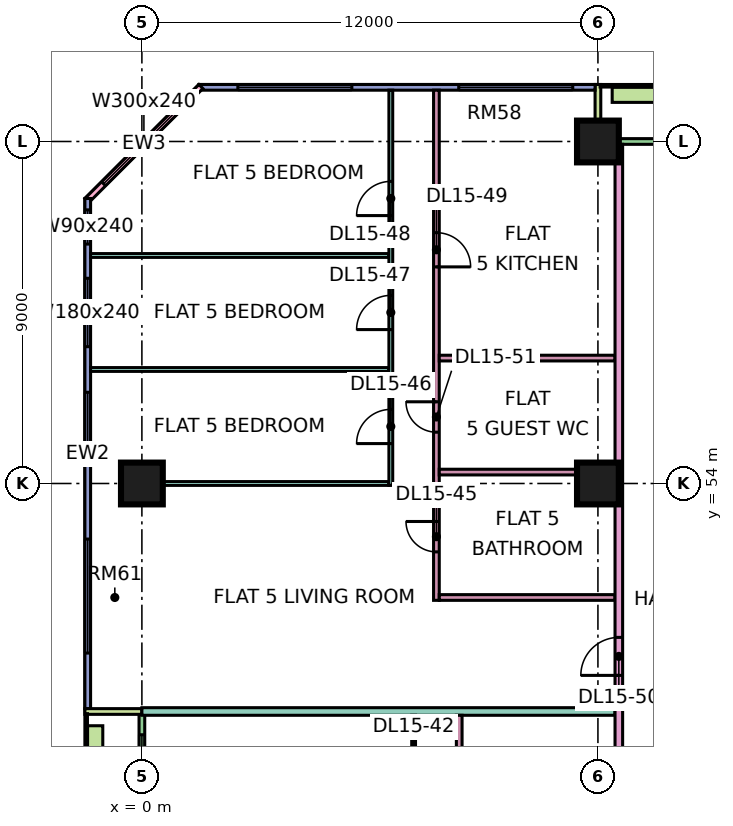
"""IFC4 building model, lengths in metres.
Left out: names, types, materials, properties, quantities, classifications, styles, units other than length and angle.
Written with IfcOpenShell. Run it as: python <this file> out.ifc"""

import sys

from ifc_helpers import new_model, si_unit, direction, frame, frame_2d, origin, origin_2d, place, context, subcontext, project, spatial, rectangle, extrude, element, fill, save


model = new_model("IFC4")
c1 = context("Model", 3, precision=1e-05, world=origin(), true_north=direction((0.0, 1.0)))
c2 = subcontext(c1, "Body", "Model", "MODEL_VIEW")
j1 = project(units=[si_unit("LENGTHUNIT", "METRE"), si_unit("PLANEANGLEUNIT", "RADIAN")], contexts=[c1])
p1 = place(None, origin())
s1 = spatial("IfcSite", under=j1, at=p1, CompositionType="ELEMENT")
p2 = place(p1, origin())
s2 = spatial("IfcBuilding", under=s1, at=p2, CompositionType="ELEMENT")
p3 = place(p2, frame((0.0, 0.0, 71.4)))
s3 = spatial("IfcBuildingStorey", under=s2, at=p3, CompositionType="ELEMENT", Elevation=71.4)
p4 = place(p3, frame((0.0, 54.0, 0.0), z_axis=(0.0, 0.0, 1.0), x_axis=(1.0, 0.0, 0.0)))
e1 = element("IfcColumn", 1, at=p4, inside=s3, PredefinedType="COLUMN", context=c2, shape_type="SweptSolid", body=[
    extrude(rectangle(XDim=1.1, YDim=1.1, at=origin_2d()), origin(), (0.0, 0.0, 1.0), 3.75),
])
for number, where, z_axis, x_axis in (
    (2, (12.0, 54.0, 0.0), (0.0, 0.0, 1.0), (1.0, 0.0, 0.0)),
    (3, (12.0, 63.0, 0.0), (0.0, 0.0, 1.0), (1.0, 0.0, 0.0)),
):
    element("IfcColumn", number, at=place(p3, frame(where, z_axis=z_axis, x_axis=x_axis)), inside=s3, PredefinedType="COLUMN", context=c2, shape_type="SweptSolid", body=[
        extrude(rectangle(XDim=1.1, YDim=1.1, at=origin_2d()), origin(), (0.0, 0.0, 1.0), 3.75),
    ])
p5 = place(p3, frame((22.425, 63.0, 0.0), z_axis=(0.0, 0.0, 1.0), x_axis=(-1.0, 0.0, 0.0)))
e4 = element("IfcWall", 4, at=p5, inside=s3, PredefinedType="SOLIDWALL", context=c2, shape_type="SweptSolid", body=[
    extrude(rectangle(XDim=10.35, YDim=0.15, at=frame_2d((5.175, 0.0))), origin(), (0.0, 0.0, 1.0), 3.35),
])
p6 = place(p5, frame((2.512, 0.0, 0.0)))
e5 = element("IfcOpeningElement", 5, at=p6, cuts=e4, PredefinedType="OPENING", context=c2, shape_type="SweptSolid", body=[
    extrude(rectangle(XDim=1.8, YDim=2.4, at=frame_2d((0.9, 1.2))), frame((0.0, 0.085, 0.0), z_axis=(0.0, -1.0, 0.0), x_axis=(1.0, 0.0, 0.0)), (0.0, 0.0, 1.0), 0.17),
])
p7 = place(p3, frame((12.0, 64.5, 0.0), z_axis=(0.0, 0.0, 1.0), x_axis=(0.0, -1.0, 0.0)))
e6 = element("IfcWall", 6, at=p7, inside=s3, PredefinedType="SOLIDWALL", context=c2, shape_type="SweptSolid", body=[
    extrude(rectangle(XDim=1.5, YDim=0.15, at=frame_2d((0.75, 0.0))), origin(), (0.0, 0.0, 1.0), 3.35),
])
p8 = place(p3, frame((11.925, 64.425, 0.0), z_axis=(0.0, 0.0, 1.0), x_axis=(-1.0, 0.0, 0.0)))
e7 = element("IfcWall", 7, at=p8, inside=s3, PredefinedType="SOLIDWALL", context=c2, shape_type="SweptSolid", body=[
    extrude(rectangle(XDim=10.425, YDim=0.15, at=frame_2d((5.212, 0.0))), origin(), (0.0, 0.0, 1.0), 3.35),
])
p9 = place(p8, frame((0.587, 0.0, 0.45)))
e8 = element("IfcOpeningElement", 8, at=p9, cuts=e7, PredefinedType="OPENING", context=c2, shape_type="SweptSolid", body=[
    extrude(rectangle(XDim=3.0, YDim=2.4, at=frame_2d((1.5, 1.2))), frame((0.0, 0.085, 0.0), z_axis=(0.0, -1.0, 0.0), x_axis=(1.0, 0.0, 0.0)), (0.0, 0.0, 1.0), 0.17),
])
p10 = place(p8, frame((6.4, 0.0, 0.45)))
e9 = element("IfcOpeningElement", 9, at=p10, cuts=e7, PredefinedType="OPENING", context=c2, shape_type="SweptSolid", body=[
    extrude(rectangle(XDim=3.0, YDim=2.4, at=frame_2d((1.5, 1.2))), frame((0.0, 0.085, 0.0), z_axis=(0.0, -1.0, 0.0), x_axis=(1.0, 0.0, 0.0)), (0.0, 0.0, 1.0), 0.17),
])
p11 = place(p3, frame((1.553, 64.447, 0.0), z_axis=(0.0, 0.0, 1.0), x_axis=(-0.707106781187, -0.707106781187, 0.0)))
e10 = element("IfcWall", 10, at=p11, inside=s3, PredefinedType="SOLIDWALL", context=c2, shape_type="SweptSolid", body=[
    extrude(rectangle(XDim=4.243, YDim=0.15, at=frame_2d((2.121, 0.0))), origin(), (0.0, 0.0, 1.0), 3.35),
])
p12 = place(p11, frame((0.621, 0.0, 0.45)))
e11 = element("IfcOpeningElement", 11, at=p12, cuts=e10, PredefinedType="OPENING", context=c2, shape_type="SweptSolid", body=[
    extrude(rectangle(XDim=3.0, YDim=2.4, at=frame_2d((1.5, 1.2))), frame((0.0, 0.085, 0.0), z_axis=(0.0, -1.0, 0.0), x_axis=(1.0, 0.0, 0.0)), (0.0, 0.0, 1.0), 0.17),
])
p13 = place(p3, frame((-1.425, 61.5, 0.0), z_axis=(0.0, 0.0, 1.0), x_axis=(0.0, -1.0, 0.0)))
e12 = element("IfcWall", 12, at=p13, inside=s3, PredefinedType="SOLIDWALL", context=c2, shape_type="SweptSolid", body=[
    extrude(rectangle(XDim=13.425, YDim=0.15, at=frame_2d((6.712, 0.0))), origin(), (0.0, 0.0, 1.0), 3.35),
])
p14 = place(p13, frame((0.3, 0.0, 0.45)))
e13 = element("IfcOpeningElement", 13, at=p14, cuts=e12, PredefinedType="OPENING", context=c2, shape_type="SweptSolid", body=[
    extrude(rectangle(XDim=0.9, YDim=2.4, at=frame_2d((0.45, 1.2))), frame((0.0, 0.085, 0.0), z_axis=(0.0, -1.0, 0.0), x_axis=(1.0, 0.0, 0.0)), (0.0, 0.0, 1.0), 0.17),
])
p15 = place(p13, frame((2.1, 0.0, 0.45)))
e14 = element("IfcOpeningElement", 14, at=p15, cuts=e12, PredefinedType="OPENING", context=c2, shape_type="SweptSolid", body=[
    extrude(rectangle(XDim=1.8, YDim=2.4, at=frame_2d((0.9, 1.2))), frame((0.0, 0.085, 0.0), z_axis=(0.0, -1.0, 0.0), x_axis=(1.0, 0.0, 0.0)), (0.0, 0.0, 1.0), 0.17),
])
p16 = place(p13, frame((5.1, 0.0, 0.45)))
e15 = element("IfcOpeningElement", 15, at=p16, cuts=e12, PredefinedType="OPENING", context=c2, shape_type="SweptSolid", body=[
    extrude(rectangle(XDim=1.8, YDim=2.4, at=frame_2d((0.9, 1.2))), frame((0.0, 0.085, 0.0), z_axis=(0.0, -1.0, 0.0), x_axis=(1.0, 0.0, 0.0)), (0.0, 0.0, 1.0), 0.17),
])
p17 = place(p13, frame((8.962, 0.0, 0.45)))
e16 = element("IfcOpeningElement", 16, at=p17, cuts=e12, PredefinedType="OPENING", context=c2, shape_type="SweptSolid", body=[
    extrude(rectangle(XDim=3.0, YDim=2.4, at=frame_2d((1.5, 1.2))), frame((0.0, 0.085, 0.0), z_axis=(0.0, -1.0, 0.0), x_axis=(1.0, 0.0, 0.0)), (0.0, 0.0, 1.0), 0.17),
])
p18 = place(p3, frame((0.0, 47.925, 0.0), z_axis=(0.0, 0.0, 1.0), x_axis=(0.0, -1.0, 0.0)))
e17 = element("IfcWall", 17, at=p18, inside=s3, PredefinedType="SOLIDWALL", context=c2, shape_type="SweptSolid", body=[
    extrude(rectangle(XDim=11.85, YDim=0.15, at=frame_2d((5.925, 0.0))), origin(), (0.0, 0.0, 1.0), 3.35),
])
p19 = place(p18, frame((0.538, 0.0, 0.45)))
e18 = element("IfcOpeningElement", 18, at=p19, cuts=e17, PredefinedType="OPENING", context=c2, shape_type="SweptSolid", body=[
    extrude(rectangle(XDim=1.2, YDim=2.4, at=frame_2d((0.6, 1.2))), frame((0.0, 0.085, 0.0), z_axis=(0.0, -1.0, 0.0), x_axis=(1.0, 0.0, 0.0)), (0.0, 0.0, 1.0), 0.17),
])
p20 = place(p18, frame((4.15, 0.0, 0.45)))
e19 = element("IfcOpeningElement", 19, at=p20, cuts=e17, PredefinedType="OPENING", context=c2, shape_type="SweptSolid", body=[
    extrude(rectangle(XDim=1.2, YDim=2.4, at=frame_2d((0.6, 1.2))), frame((0.0, 0.085, 0.0), z_axis=(0.0, -1.0, 0.0), x_axis=(1.0, 0.0, 0.0)), (0.0, 0.0, 1.0), 0.17),
])
p21 = place(p18, frame((6.525, 0.0, 0.0)))
e20 = element("IfcOpeningElement", 20, at=p21, cuts=e17, PredefinedType="OPENING", context=c2, shape_type="SweptSolid", body=[
    extrude(rectangle(XDim=1.8, YDim=2.4, at=frame_2d((0.9, 1.2))), frame((0.0, 0.085, 0.0), z_axis=(0.0, -1.0, 0.0), x_axis=(1.0, 0.0, 0.0)), (0.0, 0.0, 1.0), 0.17),
])
p22 = place(p18, frame((9.5, 0.0, 0.45)))
e21 = element("IfcOpeningElement", 21, at=p22, cuts=e17, PredefinedType="OPENING", context=c2, shape_type="SweptSolid", body=[
    extrude(rectangle(XDim=1.2, YDim=2.4, at=frame_2d((0.6, 1.2))), frame((0.0, 0.085, 0.0), z_axis=(0.0, -1.0, 0.0), x_axis=(1.0, 0.0, 0.0)), (0.0, 0.0, 1.0), 0.17),
])
p23 = place(p3, frame((-1.5, 48.0, 0.0), z_axis=(0.0, 0.0, 1.0), x_axis=(1.0, 0.0, 0.0)))
e22 = element("IfcWall", 22, at=p23, inside=s3, PredefinedType="SOLIDWALL", context=c2, shape_type="SweptSolid", body=[
    extrude(rectangle(XDim=1.5, YDim=0.15, at=frame_2d((0.75, 0.0))), origin(), (0.0, 0.0, 1.0), 3.35),
])
p24 = place(p3, frame((22.125, 64.229, 0.0), z_axis=(0.0, 0.0, 1.0), x_axis=(-1.0, 0.0, 0.0)))
e23 = element("IfcWall", 23, at=p24, inside=s3, PredefinedType="SOLIDWALL", context=c2, shape_type="SweptSolid", body=[
    extrude(rectangle(XDim=9.75, YDim=0.4, at=frame_2d((4.875, 0.0))), origin(), (0.0, 0.0, 1.0), 0.7),
])
p25 = place(p3, frame((-1.229, 47.625, 0.0), z_axis=(0.0, 0.0, 1.0), x_axis=(0.0, -1.0, 0.0)))
e24 = element("IfcWall", 24, at=p25, inside=s3, PredefinedType="SOLIDWALL", context=c2, shape_type="SweptSolid", body=[
    extrude(rectangle(XDim=11.25, YDim=0.4, at=frame_2d((5.625, 0.0))), origin(), (0.0, 0.0, 1.0), 0.7),
])
for number, where, z_axis, x_axis in (
    (25, (-1.351, 57.0, 0.0), (0.0, 0.0, 1.0), (1.0, 0.0, 0.0)),
    (26, (-1.351, 60.0, 0.0), (0.0, 0.0, 1.0), (1.0, 0.0, 0.0)),
):
    element("IfcWall", number, at=place(p3, frame(where, z_axis=z_axis, x_axis=x_axis)), inside=s3, PredefinedType="PARTITIONING", context=c2, shape_type="SweptSolid", body=[
        extrude(rectangle(XDim=7.851, YDim=0.1, at=frame_2d((3.926, 0.0))), origin(), (0.0, 0.0, 1.0), 3.35),
    ])
p26 = place(p3, frame((0.0, 48.0, 0.0), z_axis=(0.0, 0.0, 1.0), x_axis=(1.0, 0.0, 0.0)))
e27 = element("IfcWall", 27, at=p26, inside=s3, PredefinedType="PARTITIONING", context=c2, shape_type="SweptSolid", body=[
    extrude(rectangle(XDim=12.45, YDim=0.2, at=frame_2d((6.225, 0.0))), origin(), (0.0, 0.0, 1.0), 3.35),
])
e28 = element("IfcWall", 28, at=p4, inside=s3, PredefinedType="PARTITIONING", context=c2, shape_type="SweptSolid", body=[
    extrude(rectangle(XDim=6.5, YDim=0.1, at=frame_2d((3.25, 0.0))), origin(), (0.0, 0.0, 1.0), 3.35),
])
p27 = place(p3, frame((6.55, 53.95, 0.0), z_axis=(0.0, 0.0, 1.0), x_axis=(0.0, 1.0, 0.0)))
e29 = element("IfcWall", 29, at=p27, inside=s3, PredefinedType="PARTITIONING", context=c2, shape_type="SweptSolid", body=[
    extrude(rectangle(XDim=10.4, YDim=0.1, at=frame_2d((5.2, 0.0))), origin(), (0.0, 0.0, 1.0), 3.35),
])
p28 = place(p27, frame((1.1, 0.0, 0.0)))
e30 = element("IfcOpeningElement", 30, at=p28, cuts=e29, PredefinedType="OPENING", context=c2, shape_type="SweptSolid", body=[
    extrude(rectangle(XDim=0.9, YDim=2.1, at=frame_2d((0.45, 1.05))), frame((0.0, 0.06, 0.0), z_axis=(0.0, -1.0, 0.0), x_axis=(1.0, 0.0, 0.0)), (0.0, 0.0, 1.0), 0.12),
])
p29 = place(p27, frame((4.1, 0.0, 0.0)))
e31 = element("IfcOpeningElement", 31, at=p29, cuts=e29, PredefinedType="OPENING", context=c2, shape_type="SweptSolid", body=[
    extrude(rectangle(XDim=0.9, YDim=2.1, at=frame_2d((0.45, 1.05))), frame((0.0, 0.06, 0.0), z_axis=(0.0, -1.0, 0.0), x_axis=(1.0, 0.0, 0.0)), (0.0, 0.0, 1.0), 0.12),
])
p30 = place(p27, frame((7.1, 0.0, 0.0)))
e32 = element("IfcOpeningElement", 32, at=p30, cuts=e29, PredefinedType="OPENING", context=c2, shape_type="SweptSolid", body=[
    extrude(rectangle(XDim=0.9, YDim=2.1, at=frame_2d((0.45, 1.05))), frame((0.0, 0.06, 0.0), z_axis=(0.0, -1.0, 0.0), x_axis=(1.0, 0.0, 0.0)), (0.0, 0.0, 1.0), 0.12),
])
p31 = place(p3, frame((7.15, 42.05, 0.0), z_axis=(0.0, 0.0, 1.0), x_axis=(0.0, 1.0, 0.0)))
e33 = element("IfcWall", 33, at=p31, inside=s3, PredefinedType="PARTITIONING", context=c2, shape_type="SweptSolid", body=[
    extrude(rectangle(XDim=5.85, YDim=0.1, at=frame_2d((2.925, 0.0))), origin(), (0.0, 0.0, 1.0), 3.35),
])
p32 = place(p31, frame((1.0, 0.0, 0.0)))
e34 = element("IfcOpeningElement", 34, at=p32, cuts=e33, PredefinedType="OPENING", context=c2, shape_type="SweptSolid", body=[
    extrude(rectangle(XDim=0.9, YDim=2.1, at=frame_2d((0.45, 1.05))), frame((0.0, 0.06, 0.0), z_axis=(0.0, -1.0, 0.0), x_axis=(1.0, 0.0, 0.0)), (0.0, 0.0, 1.0), 0.12),
])
p33 = place(p31, frame((4.0, 0.0, 0.0)))
e35 = element("IfcOpeningElement", 35, at=p33, cuts=e33, PredefinedType="OPENING", context=c2, shape_type="SweptSolid", body=[
    extrude(rectangle(XDim=0.9, YDim=2.1, at=frame_2d((0.45, 1.05))), frame((0.0, 0.06, 0.0), z_axis=(0.0, -1.0, 0.0), x_axis=(1.0, 0.0, 0.0)), (0.0, 0.0, 1.0), 0.12),
])
p34 = place(p3, frame((7.75, 50.925, 0.0), z_axis=(0.0, 0.0, 1.0), x_axis=(0.0, 1.0, 0.0)))
e36 = element("IfcWall", 36, at=p34, inside=s3, PredefinedType="PARTITIONING", context=c2, shape_type="SweptSolid", body=[
    extrude(rectangle(XDim=13.425, YDim=0.15, at=frame_2d((6.712, 0.0))), origin(), (0.0, 0.0, 1.0), 3.35),
])
p35 = place(p34, frame((1.275, 0.0, 0.0)))
e37 = element("IfcOpeningElement", 37, at=p35, cuts=e36, PredefinedType="OPENING", context=c2, shape_type="SweptSolid", body=[
    extrude(rectangle(XDim=0.8, YDim=2.1, at=frame_2d((0.4, 1.05))), frame((0.0, 0.085, 0.0), z_axis=(0.0, -1.0, 0.0), x_axis=(1.0, 0.0, 0.0)), (0.0, 0.0, 1.0), 0.17),
])
p36 = place(p34, frame((8.775, 0.0, 0.0)))
e38 = element("IfcOpeningElement", 38, at=p36, cuts=e36, PredefinedType="OPENING", context=c2, shape_type="SweptSolid", body=[
    extrude(rectangle(XDim=0.9, YDim=2.1, at=frame_2d((0.45, 1.05))), frame((0.0, 0.085, 0.0), z_axis=(0.0, -1.0, 0.0), x_axis=(1.0, 0.0, 0.0)), (0.0, 0.0, 1.0), 0.17),
])
p37 = place(p34, frame((4.425, 0.0, 0.0)))
e39 = element("IfcOpeningElement", 39, at=p37, cuts=e36, PredefinedType="OPENING", context=c2, shape_type="SweptSolid", body=[
    extrude(rectangle(XDim=0.8, YDim=2.1, at=frame_2d((0.4, 1.05))), frame((0.0, 0.085, 0.0), z_axis=(0.0, -1.0, 0.0), x_axis=(1.0, 0.0, 0.0)), (0.0, 0.0, 1.0), 0.17),
])
for number, where, z_axis, x_axis in (
    (40, (7.825, 51.0, 0.0), (0.0, 0.0, 1.0), (1.0, 0.0, 0.0)),
    (41, (7.825, 54.3, 0.0), (0.0, 0.0, 1.0), (1.0, 0.0, 0.0)),
    (42, (7.825, 57.3, 0.0), (0.0, 0.0, 1.0), (1.0, 0.0, 0.0)),
):
    element("IfcWall", number, at=place(p3, frame(where, z_axis=z_axis, x_axis=x_axis)), inside=s3, PredefinedType="PARTITIONING", context=c2, shape_type="SweptSolid", body=[
        extrude(rectangle(XDim=4.625, YDim=0.15, at=frame_2d((2.312, 0.0))), origin(), (0.0, 0.0, 1.0), 3.35),
    ])
p38 = place(p3, frame((8.35, 39.225, 0.0), z_axis=(0.0, 0.0, 1.0), x_axis=(0.0, 1.0, 0.0)))
e43 = element("IfcWall", 43, at=p38, inside=s3, PredefinedType="PARTITIONING", context=c2, shape_type="SweptSolid", body=[
    extrude(rectangle(XDim=8.675, YDim=0.15, at=frame_2d((4.337, 0.0))), origin(), (0.0, 0.0, 1.0), 3.35),
])
p39 = place(p38, frame((5.025, 0.0, 0.0)))
e44 = element("IfcOpeningElement", 44, at=p39, cuts=e43, PredefinedType="OPENING", context=c2, shape_type="SweptSolid", body=[
    extrude(rectangle(XDim=0.9, YDim=2.1, at=frame_2d((0.45, 1.05))), frame((0.0, 0.085, 0.0), z_axis=(0.0, -1.0, 0.0), x_axis=(1.0, 0.0, 0.0)), (0.0, 0.0, 1.0), 0.17),
])
p40 = place(p3, frame((12.55, 20.0, 0.0), z_axis=(0.0, 0.0, 1.0), x_axis=(0.0, 1.0, 0.0)))
e45 = element("IfcWall", 45, at=p40, inside=s3, PredefinedType="PARTITIONING", context=c2, shape_type="SweptSolid", body=[
    extrude(rectangle(XDim=42.926, YDim=0.2, at=frame_2d((21.463, 0.0))), origin(), (0.0, 0.0, 1.0), 3.35),
])
p41 = place(p40, frame((17.1, 0.0, 0.0)))
e46 = element("IfcOpeningElement", 46, at=p41, cuts=e45, PredefinedType="OPENING", context=c2, shape_type="SweptSolid", body=[
    extrude(rectangle(XDim=1.0, YDim=2.1, at=frame_2d((0.5, 1.05))), frame((0.0, 0.11, 0.0), z_axis=(0.0, -1.0, 0.0), x_axis=(1.0, 0.0, 0.0)), (0.0, 0.0, 1.0), 0.22),
])
p42 = place(p40, frame((28.95, 0.0, 0.0)))
e47 = element("IfcOpeningElement", 47, at=p42, cuts=e45, PredefinedType="OPENING", context=c2, shape_type="SweptSolid", body=[
    extrude(rectangle(XDim=1.0, YDim=2.1, at=frame_2d((0.5, 1.05))), frame((0.0, 0.11, 0.0), z_axis=(0.0, -1.0, 0.0), x_axis=(1.0, 0.0, 0.0)), (0.0, 0.0, 1.0), 0.22),
])
p43 = place(p40, frame((0.6, 0.0, 0.0)))
e48 = element("IfcOpeningElement", 48, at=p43, cuts=e45, PredefinedType="OPENING", context=c2, shape_type="SweptSolid", body=[
    extrude(rectangle(XDim=1.2, YDim=2.1, at=frame_2d((0.6, 1.05))), frame((0.0, 0.11, 0.0), z_axis=(0.0, -1.0, 0.0), x_axis=(1.0, 0.0, 0.0)), (0.0, 0.0, 1.0), 0.22),
])
p44 = place(p40, frame((11.1, 0.0, 0.0)))
e49 = element("IfcOpeningElement", 49, at=p44, cuts=e45, PredefinedType="OPENING", context=c2, shape_type="SweptSolid", body=[
    extrude(rectangle(XDim=1.0, YDim=2.1, at=frame_2d((0.5, 1.05))), frame((0.0, 0.11, 0.0), z_axis=(0.0, -1.0, 0.0), x_axis=(1.0, 0.0, 0.0)), (0.0, 0.0, 1.0), 0.22),
])
p45 = place(p9, origin())
e50 = element("IfcWindow", 50, at=p45, inside=s3, PartitioningType="SINGLE_PANEL", PredefinedType="WINDOW", context=c2, shape_type="SweptSolid", body=[
    extrude(rectangle(XDim=3.0, YDim=2.4, at=frame_2d((1.5, 1.2))), frame((0.0, 0.03, 0.0), z_axis=(0.0, -1.0, 0.0), x_axis=(1.0, 0.0, 0.0)), (0.0, 0.0, 1.0), 0.06),
])
fill(e8, e50)
p46 = place(p10, origin())
e51 = element("IfcWindow", 51, at=p46, inside=s3, PartitioningType="SINGLE_PANEL", PredefinedType="WINDOW", context=c2, shape_type="SweptSolid", body=[
    extrude(rectangle(XDim=3.0, YDim=2.4, at=frame_2d((1.5, 1.2))), frame((0.0, 0.03, 0.0), z_axis=(0.0, -1.0, 0.0), x_axis=(1.0, 0.0, 0.0)), (0.0, 0.0, 1.0), 0.06),
])
fill(e9, e51)
p47 = place(p12, origin())
e52 = element("IfcWindow", 52, at=p47, inside=s3, PartitioningType="SINGLE_PANEL", PredefinedType="WINDOW", context=c2, shape_type="SweptSolid", body=[
    extrude(rectangle(XDim=3.0, YDim=2.4, at=frame_2d((1.5, 1.2))), frame((0.0, 0.03, 0.0), z_axis=(0.0, -1.0, 0.0), x_axis=(1.0, 0.0, 0.0)), (0.0, 0.0, 1.0), 0.06),
])
fill(e11, e52)
p48 = place(p14, origin())
e53 = element("IfcWindow", 53, at=p48, inside=s3, PartitioningType="SINGLE_PANEL", PredefinedType="WINDOW", context=c2, shape_type="SweptSolid", body=[
    extrude(rectangle(XDim=0.9, YDim=2.4, at=frame_2d((0.45, 1.2))), frame((0.0, 0.03, 0.0), z_axis=(0.0, -1.0, 0.0), x_axis=(1.0, 0.0, 0.0)), (0.0, 0.0, 1.0), 0.06),
])
fill(e13, e53)
p49 = place(p15, origin())
e54 = element("IfcWindow", 54, at=p49, inside=s3, PartitioningType="SINGLE_PANEL", PredefinedType="WINDOW", context=c2, shape_type="SweptSolid", body=[
    extrude(rectangle(XDim=1.8, YDim=2.4, at=frame_2d((0.9, 1.2))), frame((0.0, 0.03, 0.0), z_axis=(0.0, -1.0, 0.0), x_axis=(1.0, 0.0, 0.0)), (0.0, 0.0, 1.0), 0.06),
])
fill(e14, e54)
p50 = place(p16, origin())
e55 = element("IfcWindow", 55, at=p50, inside=s3, PartitioningType="SINGLE_PANEL", PredefinedType="WINDOW", context=c2, shape_type="SweptSolid", body=[
    extrude(rectangle(XDim=1.8, YDim=2.4, at=frame_2d((0.9, 1.2))), frame((0.0, 0.03, 0.0), z_axis=(0.0, -1.0, 0.0), x_axis=(1.0, 0.0, 0.0)), (0.0, 0.0, 1.0), 0.06),
])
fill(e15, e55)
p51 = place(p17, origin())
e56 = element("IfcWindow", 56, at=p51, inside=s3, PartitioningType="SINGLE_PANEL", PredefinedType="WINDOW", context=c2, shape_type="SweptSolid", body=[
    extrude(rectangle(XDim=3.0, YDim=2.4, at=frame_2d((1.5, 1.2))), frame((0.0, 0.03, 0.0), z_axis=(0.0, -1.0, 0.0), x_axis=(1.0, 0.0, 0.0)), (0.0, 0.0, 1.0), 0.06),
])
fill(e16, e56)
p52 = place(p19, origin())
e57 = element("IfcWindow", 57, at=p52, inside=s3, PartitioningType="SINGLE_PANEL", PredefinedType="WINDOW", context=c2, shape_type="SweptSolid", body=[
    extrude(rectangle(XDim=1.2, YDim=2.4, at=frame_2d((0.6, 1.2))), frame((0.0, 0.03, 0.0), z_axis=(0.0, -1.0, 0.0), x_axis=(1.0, 0.0, 0.0)), (0.0, 0.0, 1.0), 0.06),
])
fill(e18, e57)
p53 = place(p35, frame((0.8, 0.0, 0.0), z_axis=(0.0, 0.0, 1.0), x_axis=(-1.0, 0.0, 0.0)))
e58 = element("IfcDoor", 58, at=p53, inside=s3, OperationType="SINGLE_SWING_RIGHT", PredefinedType="DOOR", context=c2, shape_type="SweptSolid", body=[
    extrude(rectangle(XDim=0.8, YDim=2.1, at=frame_2d((0.4, 1.05))), frame((0.0, 0.025, 0.0), z_axis=(0.0, -1.0, 0.0), x_axis=(1.0, 0.0, 0.0)), (0.0, 0.0, 1.0), 0.05),
])
fill(e37, e58)
p54 = place(p28, origin())
e59 = element("IfcDoor", 59, at=p54, inside=s3, OperationType="SINGLE_SWING_LEFT", PredefinedType="DOOR", context=c2, shape_type="SweptSolid", body=[
    extrude(rectangle(XDim=0.9, YDim=2.1, at=frame_2d((0.45, 1.05))), frame((0.0, 0.025, 0.0), z_axis=(0.0, -1.0, 0.0), x_axis=(1.0, 0.0, 0.0)), (0.0, 0.0, 1.0), 0.05),
])
fill(e30, e59)
p55 = place(p29, origin())
e60 = element("IfcDoor", 60, at=p55, inside=s3, OperationType="SINGLE_SWING_LEFT", PredefinedType="DOOR", context=c2, shape_type="SweptSolid", body=[
    extrude(rectangle(XDim=0.9, YDim=2.1, at=frame_2d((0.45, 1.05))), frame((0.0, 0.025, 0.0), z_axis=(0.0, -1.0, 0.0), x_axis=(1.0, 0.0, 0.0)), (0.0, 0.0, 1.0), 0.05),
])
fill(e31, e60)
p56 = place(p30, origin())
e61 = element("IfcDoor", 61, at=p56, inside=s3, OperationType="SINGLE_SWING_LEFT", PredefinedType="DOOR", context=c2, shape_type="SweptSolid", body=[
    extrude(rectangle(XDim=0.9, YDim=2.1, at=frame_2d((0.45, 1.05))), frame((0.0, 0.025, 0.0), z_axis=(0.0, -1.0, 0.0), x_axis=(1.0, 0.0, 0.0)), (0.0, 0.0, 1.0), 0.05),
])
fill(e32, e61)
p57 = place(p36, frame((0.9, 0.0, 0.0), z_axis=(0.0, 0.0, 1.0), x_axis=(-1.0, 0.0, 0.0)))
e62 = element("IfcDoor", 62, at=p57, inside=s3, OperationType="SINGLE_SWING_LEFT", PredefinedType="DOOR", context=c2, shape_type="SweptSolid", body=[
    extrude(rectangle(XDim=0.9, YDim=2.1, at=frame_2d((0.45, 1.05))), frame((0.0, 0.025, 0.0), z_axis=(0.0, -1.0, 0.0), x_axis=(1.0, 0.0, 0.0)), (0.0, 0.0, 1.0), 0.05),
])
fill(e38, e62)
p58 = place(p42, origin())
e63 = element("IfcDoor", 63, at=p58, inside=s3, OperationType="SINGLE_SWING_LEFT", PredefinedType="DOOR", context=c2, shape_type="SweptSolid", body=[
    extrude(rectangle(XDim=1.0, YDim=2.1, at=frame_2d((0.5, 1.05))), frame((0.0, 0.025, 0.0), z_axis=(0.0, -1.0, 0.0), x_axis=(1.0, 0.0, 0.0)), (0.0, 0.0, 1.0), 0.05),
])
fill(e47, e63)
p59 = place(p37, frame((0.8, 0.0, 0.0), z_axis=(0.0, 0.0, 1.0), x_axis=(-1.0, 0.0, 0.0)))
e64 = element("IfcDoor", 64, at=p59, inside=s3, OperationType="SINGLE_SWING_RIGHT", PredefinedType="DOOR", context=c2, shape_type="SweptSolid", body=[
    extrude(rectangle(XDim=0.8, YDim=2.1, at=frame_2d((0.4, 1.05))), frame((0.0, 0.025, 0.0), z_axis=(0.0, -1.0, 0.0), x_axis=(1.0, 0.0, 0.0)), (0.0, 0.0, 1.0), 0.05),
])
fill(e39, e64)
save(model, sys.argv[1])
